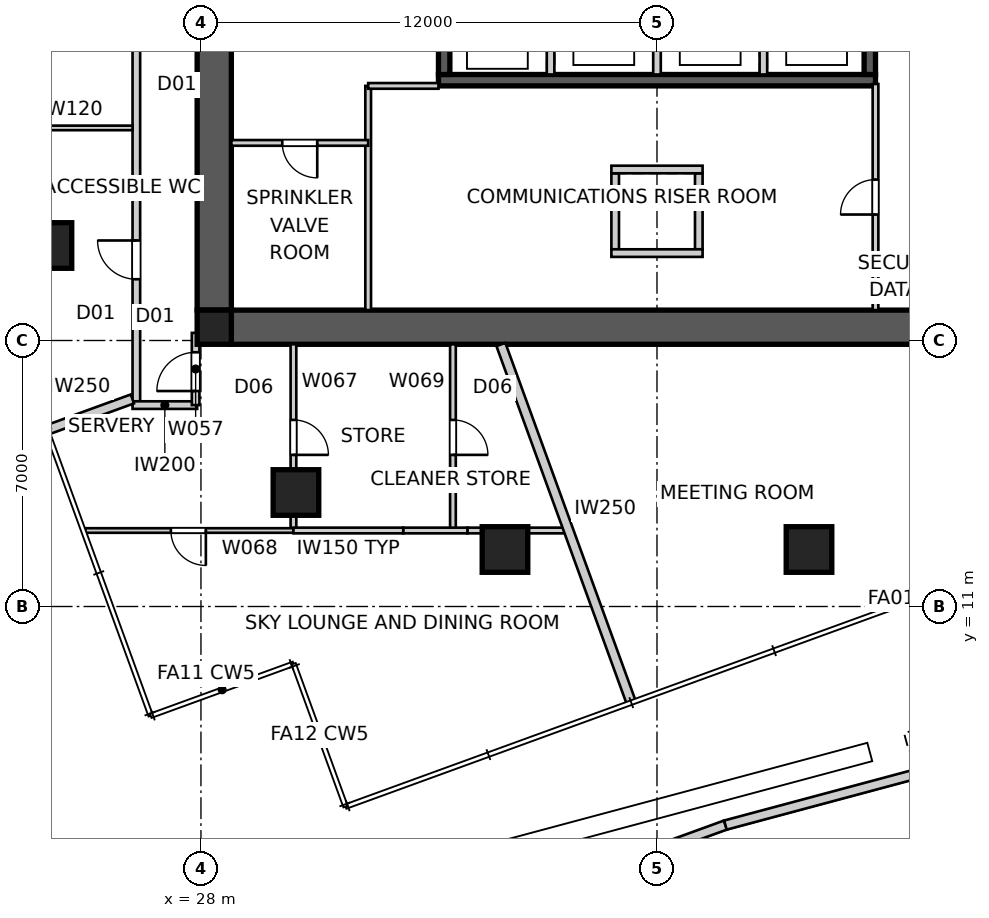
"""IFC4 building model, lengths in metres.
Left out: names, types, materials, properties, quantities, classifications, styles, units other than length and angle.
Written with IfcOpenShell. Run it as: python <this file> out.ifc"""

import sys

from ifc_helpers import new_model, si_unit, direction, frame, frame_2d, origin, origin_2d, place, context, subcontext, project, spatial, polyline, rectangle, outline, extrude, element, fill, save


model = new_model("IFC4")
c1 = context("Model", 3, precision=1e-05, world=origin(), true_north=direction((0.0, 1.0)))
c2 = subcontext(c1, "Body", "Model", "MODEL_VIEW")
j1 = project(units=[si_unit("LENGTHUNIT", "METRE"), si_unit("PLANEANGLEUNIT", "RADIAN")], contexts=[c1])
p1 = place(None, origin())
s1 = spatial("IfcSite", under=j1, at=p1, CompositionType="ELEMENT")
p2 = place(p1, origin())
s2 = spatial("IfcBuilding", under=s1, at=p2, CompositionType="ELEMENT")
p3 = place(p2, frame((0.0, 0.0, 138.8)))
s3 = spatial("IfcBuildingStorey", under=s2, at=p3, CompositionType="ELEMENT", Elevation=138.8)
p4 = place(p3, frame((51.2, 18.35, 0.0), z_axis=(0.0, 0.0, 1.0), x_axis=(-1.0, 0.0, 0.0)))
e1 = element("IfcWall", 1, at=p4, inside=s3, PredefinedType="SHEAR", context=c2, shape_type="SweptSolid", body=[
    extrude(outline(polyline([(0.0, -0.45), (22.4, -0.45), (22.4, -0.025), (22.85, -0.025), (22.85, 0.025), (22.4, 0.025), (22.4, 0.45), (0.0, 0.45), (0.0, 0.025), (-0.45, 0.025), (-0.45, -0.025), (0.0, -0.025), (0.0, -0.45)])), origin(), (0.0, 0.0, 1.0), 5.0),
])
p5 = place(p3, frame((28.35, 41.2, 0.0), z_axis=(0.0, 0.0, 1.0), x_axis=(0.0, -1.0, 0.0)))
e2 = element("IfcWall", 2, at=p5, inside=s3, PredefinedType="SHEAR", context=c2, shape_type="SweptSolid", body=[
    extrude(outline(polyline([(0.0, -0.45), (22.4, -0.45), (22.4, -0.025), (22.85, -0.025), (22.85, 0.025), (22.4, 0.025), (22.4, 0.45), (0.0, 0.45), (0.0, 0.025), (-0.45, 0.025), (-0.45, -0.025), (0.0, -0.025), (0.0, -0.45)])), origin(), (0.0, 0.0, 1.0), 5.0),
])
p6 = place(p5, frame((11.14, 0.0, 0.0)))
e3 = element("IfcOpeningElement", 3, at=p6, cuts=e2, PredefinedType="OPENING", context=c2, shape_type="SweptSolid", body=[
    extrude(rectangle(XDim=1.02, YDim=2.4, at=frame_2d((0.51, 1.2))), frame((0.0, 0.46, 0.0), z_axis=(0.0, -1.0, 0.0), x_axis=(1.0, 0.0, 0.0)), (0.0, 0.0, 1.0), 0.92),
])
p7 = place(p3, frame((45.75, 24.85, 0.0), z_axis=(0.0, 0.0, 1.0), x_axis=(-1.0, 0.0, 0.0)))
e4 = element("IfcWall", 4, at=p7, inside=s3, PredefinedType="SHEAR", context=c2, shape_type="SweptSolid", body=[
    extrude(rectangle(XDim=11.5, YDim=0.3, at=frame_2d((5.75, 0.0))), origin(), (0.0, 0.0, 1.0), 5.0),
])
p8 = place(p3, frame((45.6, 27.8, 0.0), z_axis=(0.0, 0.0, 1.0), x_axis=(0.0, -1.0, 0.0)))
e5 = element("IfcWall", 5, at=p8, inside=s3, PredefinedType="SHEAR", context=c2, shape_type="SweptSolid", body=[
    extrude(rectangle(XDim=2.8, YDim=0.3, at=frame_2d((1.4, 0.0))), origin(), (0.0, 0.0, 1.0), 5.0),
])
for number, where, z_axis, x_axis in (
    (6, (42.8, 27.8, 0.0), (0.0, 0.0, 1.0), (0.0, -1.0, 0.0)),
    (7, (40.0, 27.8, 0.0), (0.0, 0.0, 1.0), (0.0, -1.0, 0.0)),
    (8, (37.2, 27.8, 0.0), (0.0, 0.0, 1.0), (0.0, -1.0, 0.0)),
):
    element("IfcWall", number, at=place(p3, frame(where, z_axis=z_axis, x_axis=x_axis)), inside=s3, PredefinedType="SOLIDWALL", context=c2, shape_type="SweptSolid", body=[
        extrude(rectangle(XDim=2.8, YDim=0.2, at=frame_2d((1.4, 0.0))), origin(), (0.0, 0.0, 1.0), 5.0),
    ])
p9 = place(p3, frame((34.4, 27.8, 0.0), z_axis=(0.0, 0.0, 1.0), x_axis=(0.0, -1.0, 0.0)))
e9 = element("IfcWall", 9, at=p9, inside=s3, PredefinedType="SHEAR", context=c2, shape_type="SweptSolid", body=[
    extrude(rectangle(XDim=2.8, YDim=0.3, at=frame_2d((1.4, 0.0))), origin(), (0.0, 0.0, 1.0), 5.0),
])
for number, where, z_axis, x_axis in (
    (10, (38.9, 22.4, 0.0), (0.0, 0.0, 1.0), (0.0, -1.0, 0.0)),
    (11, (41.1, 22.4, 0.0), (0.0, 0.0, 1.0), (0.0, -1.0, 0.0)),
):
    element("IfcWall", number, at=place(p3, frame(where, z_axis=z_axis, x_axis=x_axis)), inside=s3, PredefinedType="SOLIDWALL", context=c2, shape_type="SweptSolid", body=[
        extrude(rectangle(XDim=2.0, YDim=0.2, at=frame_2d((1.0, 0.0))), origin(), (0.0, 0.0, 1.0), 5.0),
    ])
for number, where, z_axis, x_axis in (
    (12, (38.8, 22.5, 0.0), (0.0, 0.0, 1.0), (1.0, 0.0, 0.0)),
    (13, (38.8, 20.3, 0.0), (0.0, 0.0, 1.0), (1.0, 0.0, 0.0)),
):
    element("IfcWall", number, at=place(p3, frame(where, z_axis=z_axis, x_axis=x_axis)), inside=s3, PredefinedType="SOLIDWALL", context=c2, shape_type="SweptSolid", body=[
        extrude(rectangle(XDim=2.4, YDim=0.2, at=frame_2d((1.2, 0.0))), origin(), (0.0, 0.0, 1.0), 5.0),
    ])
p10 = place(p3, frame((28.35, 18.35, 0.0), z_axis=(0.0, 0.0, 1.0), x_axis=(1.0, 0.0, 0.0)))
e14 = element("IfcColumn", 14, at=p10, inside=s3, PredefinedType="COLUMN", context=c2, shape_type="SweptSolid", body=[
    extrude(rectangle(XDim=0.9, YDim=0.9, at=origin_2d()), origin(), (0.0, 0.0, 1.0), 5.0),
])
for number, where, z_axis, x_axis in (
    (15, (24.0, 20.5, 0.0), (0.0, 0.0, 1.0), (1.0, 0.0, 0.0)),
    (16, (30.5, 14.0, 0.0), (0.0, 0.0, 1.0), (1.0, 0.0, 0.0)),
    (17, (36.0, 12.5, 0.0), (0.0, 0.0, 1.0), (1.0, 0.0, 0.0)),
    (18, (44.0, 12.5, 0.0), (0.0, 0.0, 1.0), (1.0, 0.0, 0.0)),
):
    element("IfcColumn", number, at=place(p3, frame(where, z_axis=z_axis, x_axis=x_axis)), inside=s3, PredefinedType="COLUMN", context=c2, shape_type="SweptSolid", body=[
        extrude(rectangle(XDim=1.2, YDim=1.2, at=origin_2d()), origin(), (0.0, 0.0, 1.0), 5.0),
    ])
p11 = place(p3, frame((29.372, 0.724, -0.05), z_axis=(0.0, 0.0, 1.0), x_axis=(0.939692601126, 0.342020197341, 0.0)))
e19 = element("IfcWall", 19, at=p11, inside=s3, PredefinedType="PARAPET", context=c2, shape_type="SweptSolid", body=[
    extrude(rectangle(XDim=13.226, YDim=0.25, at=frame_2d((6.613, 0.0))), origin(), (0.0, 0.0, 1.0), 1.15),
])
p12 = place(p3, frame((41.801, 5.248, -0.05), z_axis=(0.0, 0.0, 1.0), x_axis=(0.965925409669, 0.258820599944, 0.0)))
e20 = element("IfcWall", 20, at=p12, inside=s3, PredefinedType="PARAPET", context=c2, shape_type="SweptSolid", body=[
    extrude(rectangle(XDim=29.167, YDim=0.25, at=frame_2d((14.583, 0.0))), origin(), (0.0, 0.0, 1.0), 1.15),
])
p13 = place(p3, frame((26.3, 16.3, 0.0), z_axis=(0.0, 0.0, 1.0), x_axis=(0.0, 1.0, 0.0)))
e21 = element("IfcWall", 21, at=p13, inside=s3, PredefinedType="PARTITIONING", context=c2, shape_type="SweptSolid", body=[
    extrude(rectangle(XDim=27.4, YDim=0.2, at=frame_2d((13.7, 0.0))), origin(), (0.0, 0.0, 1.0), 4.85),
])
p14 = place(p13, frame((21.639, 0.0, 0.0)))
e22 = element("IfcOpeningElement", 22, at=p14, cuts=e21, PredefinedType="OPENING", context=c2, shape_type="SweptSolid", body=[
    extrude(rectangle(XDim=1.02, YDim=2.34, at=frame_2d((0.51, 1.17))), frame((0.0, 0.11, 0.0), z_axis=(0.0, -1.0, 0.0), x_axis=(1.0, 0.0, 0.0)), (0.0, 0.0, 1.0), 0.22),
])
p15 = place(p13, frame((3.312, 0.0, 0.0)))
e23 = element("IfcOpeningElement", 23, at=p15, cuts=e21, PredefinedType="OPENING", context=c2, shape_type="SweptSolid", body=[
    extrude(rectangle(XDim=1.02, YDim=2.34, at=frame_2d((0.51, 1.17))), frame((0.0, 0.11, 0.0), z_axis=(0.0, -1.0, 0.0), x_axis=(1.0, 0.0, 0.0)), (0.0, 0.0, 1.0), 0.22),
])
p16 = place(p13, frame((9.341, 0.0, 0.0)))
e24 = element("IfcOpeningElement", 24, at=p16, cuts=e21, PredefinedType="OPENING", context=c2, shape_type="SweptSolid", body=[
    extrude(rectangle(XDim=1.02, YDim=2.34, at=frame_2d((0.51, 1.17))), frame((0.0, 0.11, 0.0), z_axis=(0.0, -1.0, 0.0), x_axis=(1.0, 0.0, 0.0)), (0.0, 0.0, 1.0), 0.22),
])
p17 = place(p13, frame((14.333, 0.0, 0.0)))
e25 = element("IfcOpeningElement", 25, at=p17, cuts=e21, PredefinedType="OPENING", context=c2, shape_type="SweptSolid", body=[
    extrude(rectangle(XDim=1.02, YDim=2.34, at=frame_2d((0.51, 1.17))), frame((0.0, 0.11, 0.0), z_axis=(0.0, -1.0, 0.0), x_axis=(1.0, 0.0, 0.0)), (0.0, 0.0, 1.0), 0.22),
])
p18 = place(p3, frame((27.9, 16.3, 0.0), z_axis=(0.0, 0.0, 1.0), x_axis=(-1.0, 0.0, 0.0)))
e26 = element("IfcWall", 26, at=p18, inside=s3, PredefinedType="PARTITIONING", context=c2, shape_type="SweptSolid", body=[
    extrude(rectangle(XDim=1.7, YDim=0.2, at=frame_2d((0.85, 0.0))), origin(), (0.0, 0.0, 1.0), 4.85),
])
p19 = place(p3, frame((27.86, 16.3, 0.0), z_axis=(0.0, 0.0, 1.0), x_axis=(0.0, 1.0, 0.0)))
e27 = element("IfcWall", 27, at=p19, inside=s3, PredefinedType="PARTITIONING", context=c2, shape_type="SweptSolid", body=[
    extrude(rectangle(XDim=1.9, YDim=0.2, at=frame_2d((0.95, 0.0))), origin(), (0.0, 0.0, 1.0), 4.85),
])
p20 = place(p19, frame((0.37, 0.0, 0.0)))
e28 = element("IfcOpeningElement", 28, at=p20, cuts=e27, PredefinedType="OPENING", context=c2, shape_type="SweptSolid", body=[
    extrude(rectangle(XDim=1.02, YDim=2.34, at=frame_2d((0.51, 1.17))), frame((0.0, 0.11, 0.0), z_axis=(0.0, -1.0, 0.0), x_axis=(1.0, 0.0, 0.0)), (0.0, 0.0, 1.0), 0.22),
])
p21 = place(p3, frame((39.323, 8.47, 0.0), z_axis=(0.0, 0.0, 1.0), x_axis=(-0.342004948299, 0.939698151184, 0.0)))
e29 = element("IfcWall", 29, at=p21, inside=s3, PredefinedType="PARTITIONING", context=c2, shape_type="SweptSolid", body=[
    extrude(rectangle(XDim=10.03, YDim=0.25, at=frame_2d((5.015, 0.0))), origin(), (0.0, 0.0, 1.0), 4.85),
])
p22 = place(p3, frame((23.942, 15.642, 0.0), z_axis=(0.0, 0.0, 1.0), x_axis=(0.939692273186, 0.342021098348, 0.0)))
e30 = element("IfcWall", 30, at=p22, inside=s3, PredefinedType="PARTITIONING", context=c2, shape_type="SweptSolid", body=[
    extrude(rectangle(XDim=2.397, YDim=0.25, at=frame_2d((1.198, 0.0))), origin(), (0.0, 0.0, 1.0), 4.85),
])
p23 = place(p3, frame((45.75, 18.8, 0.0), z_axis=(0.0, 0.0, 1.0), x_axis=(0.0, 1.0, 0.0)))
e31 = element("IfcWall", 31, at=p23, inside=s3, PredefinedType="SOLIDWALL", context=c2, shape_type="SweptSolid", body=[
    extrude(rectangle(XDim=5.95, YDim=0.15, at=frame_2d((2.975, 0.0))), origin(), (0.0, 0.0, 1.0), 4.85),
])
p24 = place(p23, frame((2.515, 0.0, 0.0)))
e32 = element("IfcOpeningElement", 32, at=p24, cuts=e31, PredefinedType="OPENING", context=c2, shape_type="SweptSolid", body=[
    extrude(rectangle(XDim=0.92, YDim=2.1, at=frame_2d((0.46, 1.05))), frame((0.0, 0.085, 0.0), z_axis=(0.0, -1.0, 0.0), x_axis=(1.0, 0.0, 0.0)), (0.0, 0.0, 1.0), 0.17),
])
p25 = place(p3, frame((32.4, 18.8, 0.0), z_axis=(0.0, 0.0, 1.0), x_axis=(0.0, 1.0, 0.0)))
e33 = element("IfcWall", 33, at=p25, inside=s3, PredefinedType="SOLIDWALL", context=c2, shape_type="SweptSolid", body=[
    extrude(rectangle(XDim=5.9, YDim=0.15, at=frame_2d((2.95, 0.0))), origin(), (0.0, 0.0, 1.0), 4.85),
])
p26 = place(p3, frame((32.4, 24.7, 0.0), z_axis=(0.0, 0.0, 1.0), x_axis=(1.0, 0.0, 0.0)))
e34 = element("IfcWall", 34, at=p26, inside=s3, PredefinedType="SOLIDWALL", context=c2, shape_type="SweptSolid", body=[
    extrude(rectangle(XDim=1.85, YDim=0.15, at=frame_2d((0.925, 0.0))), origin(), (0.0, 0.0, 1.0), 4.85),
])
p27 = place(p3, frame((32.4, 23.2, 0.0), z_axis=(0.0, 0.0, 1.0), x_axis=(-1.0, 0.0, 0.0)))
e35 = element("IfcWall", 35, at=p27, inside=s3, PredefinedType="SOLIDWALL", context=c2, shape_type="SweptSolid", body=[
    extrude(rectangle(XDim=3.6, YDim=0.15, at=frame_2d((1.8, 0.0))), origin(), (0.0, 0.0, 1.0), 4.85),
])
p28 = place(p27, frame((1.34, 0.0, 0.0)))
e36 = element("IfcOpeningElement", 36, at=p28, cuts=e35, PredefinedType="OPENING", context=c2, shape_type="SweptSolid", body=[
    extrude(rectangle(XDim=0.92, YDim=2.1, at=frame_2d((0.46, 1.05))), frame((0.0, 0.085, 0.0), z_axis=(0.0, -1.0, 0.0), x_axis=(1.0, 0.0, 0.0)), (0.0, 0.0, 1.0), 0.17),
])
p29 = place(p3, frame((23.0, 23.594, 0.0), z_axis=(0.0, 0.0, 1.0), x_axis=(1.0, 0.0, 0.0)))
e37 = element("IfcWall", 37, at=p29, inside=s3, PredefinedType="PARTITIONING", context=c2, shape_type="SweptSolid", body=[
    extrude(rectangle(XDim=3.2, YDim=0.12, at=frame_2d((1.6, 0.0))), origin(), (0.0, 0.0, 1.0), 4.85),
])
p30 = place(p3, frame((30.434, 17.9, 0.0), z_axis=(0.0, 0.0, 1.0), x_axis=(0.0, -1.0, 0.0)))
e38 = element("IfcWall", 38, at=p30, inside=s3, PredefinedType="SOLIDWALL", context=c2, shape_type="SweptSolid", body=[
    extrude(rectangle(XDim=4.9, YDim=0.15, at=frame_2d((2.45, 0.0))), origin(), (0.0, 0.0, 1.0), 4.85),
])
p31 = place(p30, frame((1.99, 0.0, 0.0)))
e39 = element("IfcOpeningElement", 39, at=p31, cuts=e38, PredefinedType="OPENING", context=c2, shape_type="SweptSolid", body=[
    extrude(rectangle(XDim=0.92, YDim=2.1, at=frame_2d((0.46, 1.05))), frame((0.0, 0.085, 0.0), z_axis=(0.0, -1.0, 0.0), x_axis=(1.0, 0.0, 0.0)), (0.0, 0.0, 1.0), 0.17),
])
p32 = place(p3, frame((30.434, 13.0, 0.0), z_axis=(0.0, 0.0, 1.0), x_axis=(-1.0, 0.0, 0.0)))
e40 = element("IfcWall", 40, at=p32, inside=s3, PredefinedType="PARTITIONING", context=c2, shape_type="SweptSolid", body=[
    extrude(rectangle(XDim=5.488, YDim=0.12, at=frame_2d((2.744, 0.0))), origin(), (0.0, 0.0, 1.0), 4.85),
])
p33 = place(p32, frame((2.305, 0.0, 0.0)))
e41 = element("IfcOpeningElement", 41, at=p33, cuts=e40, PredefinedType="OPENING", context=c2, shape_type="SweptSolid", body=[
    extrude(rectangle(XDim=0.92, YDim=2.34, at=frame_2d((0.46, 1.17))), frame((0.0, 0.07, 0.0), z_axis=(0.0, -1.0, 0.0), x_axis=(1.0, 0.0, 0.0)), (0.0, 0.0, 1.0), 0.14),
])
p34 = place(p3, frame((34.631, 17.9, 0.0), z_axis=(0.0, 0.0, 1.0), x_axis=(0.0, -1.0, 0.0)))
e42 = element("IfcWall", 42, at=p34, inside=s3, PredefinedType="SOLIDWALL", context=c2, shape_type="SweptSolid", body=[
    extrude(rectangle(XDim=4.9, YDim=0.15, at=frame_2d((2.45, 0.0))), origin(), (0.0, 0.0, 1.0), 4.85),
])
p35 = place(p34, frame((1.99, 0.0, 0.0)))
e43 = element("IfcOpeningElement", 43, at=p35, cuts=e42, PredefinedType="OPENING", context=c2, shape_type="SweptSolid", body=[
    extrude(rectangle(XDim=0.92, YDim=2.1, at=frame_2d((0.46, 1.05))), frame((0.0, 0.085, 0.0), z_axis=(0.0, -1.0, 0.0), x_axis=(1.0, 0.0, 0.0)), (0.0, 0.0, 1.0), 0.17),
])
p36 = place(p3, frame((37.674, 13.0, 0.0), z_axis=(0.0, 0.0, 1.0), x_axis=(-1.0, 0.0, 0.0)))
e44 = element("IfcWall", 44, at=p36, inside=s3, PredefinedType="SOLIDWALL", context=c2, shape_type="SweptSolid", body=[
    extrude(rectangle(XDim=2.662, YDim=0.15, at=frame_2d((1.331, 0.0))), origin(), (0.0, 0.0, 1.0), 4.85),
])
p37 = place(p3, frame((35.012, 13.0, 0.0), z_axis=(0.0, 0.0, 1.0), x_axis=(-1.0, 0.0, 0.0)))
e45 = element("IfcWall", 45, at=p37, inside=s3, PredefinedType="SOLIDWALL", context=c2, shape_type="SweptSolid", body=[
    extrude(rectangle(XDim=1.69, YDim=0.15, at=frame_2d((0.845, 0.0))), origin(), (0.0, 0.0, 1.0), 3.85),
])
p38 = place(p3, frame((33.322, 13.0, 0.0), z_axis=(0.0, 0.0, 1.0), x_axis=(-1.0, 0.0, 0.0)))
e46 = element("IfcWall", 46, at=p38, inside=s3, PredefinedType="SOLIDWALL", context=c2, shape_type="SweptSolid", body=[
    extrude(rectangle(XDim=2.887, YDim=0.15, at=frame_2d((1.444, 0.0))), origin(), (0.0, 0.0, 1.0), 4.85),
])
p39 = place(p15, origin())
e47 = element("IfcDoor", 47, at=p39, inside=s3, OperationType="SINGLE_SWING_RIGHT", PredefinedType="DOOR", context=c2, shape_type="SweptSolid", body=[
    extrude(rectangle(XDim=1.02, YDim=2.34, at=frame_2d((0.51, 1.17))), frame((0.0, 0.025, 0.0), z_axis=(0.0, -1.0, 0.0), x_axis=(1.0, 0.0, 0.0)), (0.0, 0.0, 1.0), 0.05),
])
fill(e23, e47)
p40 = place(p20, origin())
e48 = element("IfcDoor", 48, at=p40, inside=s3, OperationType="SINGLE_SWING_LEFT", PredefinedType="DOOR", context=c2, shape_type="SweptSolid", body=[
    extrude(rectangle(XDim=1.02, YDim=2.34, at=frame_2d((0.51, 1.17))), frame((0.0, 0.025, 0.0), z_axis=(0.0, -1.0, 0.0), x_axis=(1.0, 0.0, 0.0)), (0.0, 0.0, 1.0), 0.05),
])
fill(e28, e48)
p41 = place(p28, origin())
e49 = element("IfcDoor", 49, at=p41, inside=s3, OperationType="SINGLE_SWING_LEFT", PredefinedType="DOOR", context=c2, shape_type="SweptSolid", body=[
    extrude(rectangle(XDim=0.92, YDim=2.1, at=frame_2d((0.46, 1.05))), frame((0.0, 0.025, 0.0), z_axis=(0.0, -1.0, 0.0), x_axis=(1.0, 0.0, 0.0)), (0.0, 0.0, 1.0), 0.05),
])
fill(e36, e49)
p42 = place(p24, origin())
e50 = element("IfcDoor", 50, at=p42, inside=s3, OperationType="SINGLE_SWING_LEFT", PredefinedType="DOOR", context=c2, shape_type="SweptSolid", body=[
    extrude(rectangle(XDim=0.92, YDim=2.1, at=frame_2d((0.46, 1.05))), frame((0.0, 0.025, 0.0), z_axis=(0.0, -1.0, 0.0), x_axis=(1.0, 0.0, 0.0)), (0.0, 0.0, 1.0), 0.05),
])
fill(e32, e50)
p43 = place(p33, origin())
e51 = element("IfcDoor", 51, at=p43, inside=s3, OperationType="SINGLE_SWING_LEFT", PredefinedType="DOOR", context=c2, shape_type="SweptSolid", body=[
    extrude(rectangle(XDim=0.92, YDim=2.34, at=frame_2d((0.46, 1.17))), frame((0.0, 0.025, 0.0), z_axis=(0.0, -1.0, 0.0), x_axis=(1.0, 0.0, 0.0)), (0.0, 0.0, 1.0), 0.05),
])
fill(e41, e51)
p44 = place(p31, origin())
e52 = element("IfcDoor", 52, at=p44, inside=s3, OperationType="SINGLE_SWING_RIGHT", PredefinedType="DOOR", context=c2, shape_type="SweptSolid", body=[
    extrude(rectangle(XDim=0.92, YDim=2.1, at=frame_2d((0.46, 1.05))), frame((0.0, 0.025, 0.0), z_axis=(0.0, -1.0, 0.0), x_axis=(1.0, 0.0, 0.0)), (0.0, 0.0, 1.0), 0.05),
])
fill(e39, e52)
p45 = place(p35, origin())
e53 = element("IfcDoor", 53, at=p45, inside=s3, OperationType="SINGLE_SWING_RIGHT", PredefinedType="DOOR", context=c2, shape_type="SweptSolid", body=[
    extrude(rectangle(XDim=0.92, YDim=2.1, at=frame_2d((0.46, 1.05))), frame((0.0, 0.025, 0.0), z_axis=(0.0, -1.0, 0.0), x_axis=(1.0, 0.0, 0.0)), (0.0, 0.0, 1.0), 0.05),
])
fill(e43, e53)
save(model, sys.argv[1])
